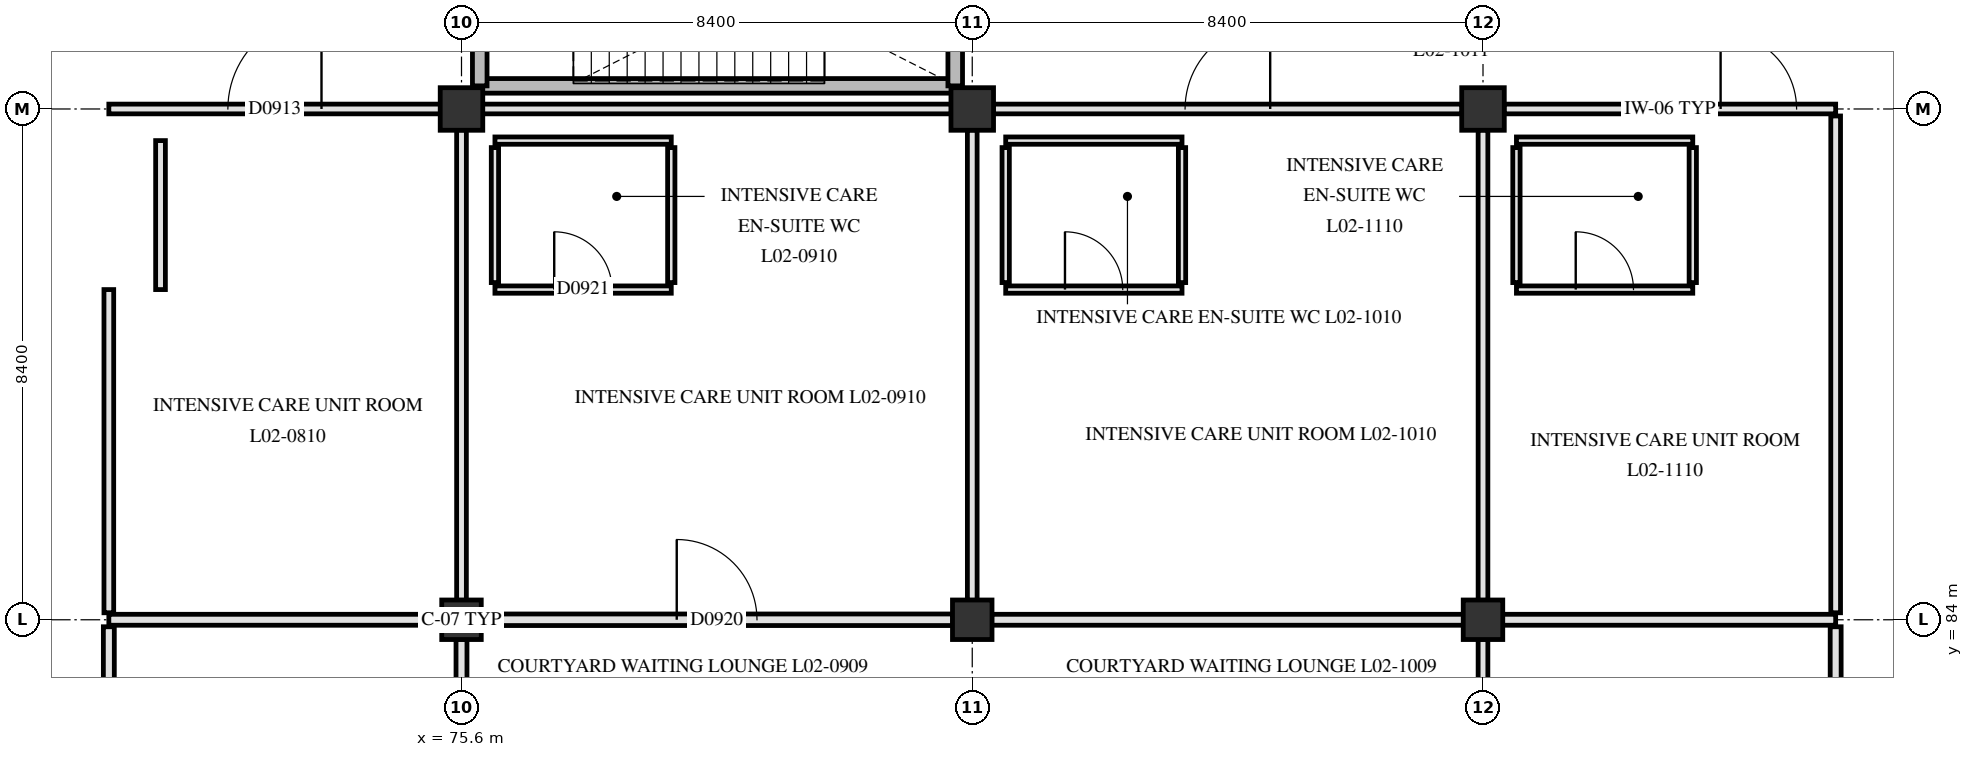
"""IFC4 building model, lengths in metres.
Left out: names, types, materials, properties, quantities, classifications, styles, units other than length and angle.
Written with IfcOpenShell. Run it as: python <this file> out.ifc"""

import sys

from ifc_helpers import new_model, si_unit, direction, frame, frame_2d, origin, origin_2d, place, context, subcontext, project, spatial, rectangle, circle, extrude, element, fill, save


model = new_model("IFC4")
c1 = context("Model", 3, precision=1e-05, world=origin(), true_north=direction((0.0, 1.0)))
c2 = subcontext(c1, "Body", "Model", "MODEL_VIEW")
j1 = project(units=[si_unit("LENGTHUNIT", "METRE"), si_unit("PLANEANGLEUNIT", "RADIAN")], contexts=[c1])
p1 = place(None, origin())
s1 = spatial("IfcSite", under=j1, at=p1, CompositionType="ELEMENT")
p2 = place(p1, origin())
s2 = spatial("IfcBuilding", under=s1, at=p2, CompositionType="ELEMENT")
p3 = place(p2, frame((0.0, 0.0, 9.3)))
s3 = spatial("IfcBuildingStorey", under=s2, at=p3, CompositionType="ELEMENT", Elevation=9.3)
p4 = place(p3, frame((75.6, 84.0, 0.0), z_axis=(0.0, 0.0, 1.0), x_axis=(1.0, 0.0, 0.0)))
e1 = element("IfcColumn", 1, at=p4, inside=s3, PredefinedType="COLUMN", context=c2, shape_type="SweptSolid", body=[
    extrude(circle(Radius=0.325, at=origin_2d()), origin(), (0.0, 0.0, 1.0), 5.1),
])
p5 = place(p3, frame((75.6, 92.4, 0.0), z_axis=(0.0, 0.0, 1.0), x_axis=(1.0, 0.0, 0.0)))
e2 = element("IfcColumn", 2, at=p5, inside=s3, PredefinedType="COLUMN", context=c2, shape_type="SweptSolid", body=[
    extrude(rectangle(XDim=0.7, YDim=0.7, at=origin_2d()), origin(), (0.0, 0.0, 1.0), 5.1),
])
p6 = place(p3, frame((84.0, 84.0, 0.0), z_axis=(0.0, 0.0, 1.0), x_axis=(1.0, 0.0, 0.0)))
e3 = element("IfcColumn", 3, at=p6, inside=s3, PredefinedType="COLUMN", context=c2, shape_type="SweptSolid", body=[
    extrude(circle(Radius=0.325, at=origin_2d()), origin(), (0.0, 0.0, 1.0), 5.1),
])
p7 = place(p3, frame((84.0, 92.4, 0.0), z_axis=(0.0, 0.0, 1.0), x_axis=(1.0, 0.0, 0.0)))
e4 = element("IfcColumn", 4, at=p7, inside=s3, PredefinedType="COLUMN", context=c2, shape_type="SweptSolid", body=[
    extrude(rectangle(XDim=0.7, YDim=0.7, at=origin_2d()), origin(), (0.0, 0.0, 1.0), 5.1),
])
p8 = place(p3, frame((92.4, 84.0, 0.0), z_axis=(0.0, 0.0, 1.0), x_axis=(1.0, 0.0, 0.0)))
e5 = element("IfcColumn", 5, at=p8, inside=s3, PredefinedType="COLUMN", context=c2, shape_type="SweptSolid", body=[
    extrude(circle(Radius=0.325, at=origin_2d()), origin(), (0.0, 0.0, 1.0), 5.1),
])
p9 = place(p3, frame((92.4, 92.4, 0.0), z_axis=(0.0, 0.0, 1.0), x_axis=(1.0, 0.0, 0.0)))
e6 = element("IfcColumn", 6, at=p9, inside=s3, PredefinedType="COLUMN", context=c2, shape_type="SweptSolid", body=[
    extrude(rectangle(XDim=0.7, YDim=0.7, at=origin_2d()), origin(), (0.0, 0.0, 1.0), 5.1),
])
p10 = place(p3, frame((75.9, 92.78, 0.0), z_axis=(0.0, 0.0, 1.0), x_axis=(1.0, 0.0, 0.0)))
e7 = element("IfcWall", 7, at=p10, inside=s3, PredefinedType="SHEAR", context=c2, shape_type="SweptSolid", body=[
    extrude(rectangle(XDim=7.82, YDim=0.24, at=frame_2d((3.91, 0.0))), origin(), (0.0, 0.0, 1.0), 4.78),
])
for number, where, z_axis, x_axis in (
    (8, (75.9, 92.78, 0.0), (0.0, 0.0, 1.0), (0.0, 1.0, 0.0)),
    (9, (83.72, 92.78, 0.0), (0.0, 0.0, 1.0), (0.0, 1.0, 0.0)),
):
    element("IfcWall", number, at=place(p3, frame(where, z_axis=z_axis, x_axis=x_axis)), inside=s3, PredefinedType="SHEAR", context=c2, shape_type="SweptSolid", body=[
        extrude(rectangle(XDim=3.32, YDim=0.24, at=frame_2d((1.66, 0.0))), origin(), (0.0, 0.0, 1.0), 4.78),
    ])
p11 = place(p3, frame((69.8, 84.0, 0.0), z_axis=(0.0, 0.0, 1.0), x_axis=(1.0, 0.0, 0.0)))
e10 = element("IfcWall", 10, at=p11, inside=s3, PredefinedType="PARTITIONING", context=c2, shape_type="SweptSolid", body=[
    extrude(rectangle(XDim=5.48, YDim=0.18, at=frame_2d((2.74, 0.0))), origin(), (0.0, 0.0, 1.0), 4.17),
])
p12 = place(p3, frame((75.92, 84.0, 0.0), z_axis=(0.0, 0.0, 1.0), x_axis=(1.0, 0.0, 0.0)))
e11 = element("IfcWall", 11, at=p12, inside=s3, PredefinedType="PARTITIONING", context=c2, shape_type="SweptSolid", body=[
    extrude(rectangle(XDim=7.76, YDim=0.19, at=frame_2d((3.88, 0.0))), origin(), (0.0, 0.0, 1.0), 4.17),
])
p13 = place(p12, frame((3.22, 0.0, 0.0)))
e12 = element("IfcOpeningElement", 12, at=p13, cuts=e11, PredefinedType="OPENING", context=c2, shape_type="SweptSolid", body=[
    extrude(rectangle(XDim=1.32, YDim=2.18, at=frame_2d((0.66, 1.09))), frame((0.0, 0.105, 0.0), z_axis=(0.0, -1.0, 0.0), x_axis=(1.0, 0.0, 0.0)), (0.0, 0.0, 1.0), 0.21),
])
p14 = place(p3, frame((84.32, 84.0, 0.0), z_axis=(0.0, 0.0, 1.0), x_axis=(1.0, 0.0, 0.0)))
e13 = element("IfcWall", 13, at=p14, inside=s3, PredefinedType="PARTITIONING", context=c2, shape_type="SweptSolid", body=[
    extrude(rectangle(XDim=7.76, YDim=0.18, at=frame_2d((3.88, 0.0))), origin(), (0.0, 0.0, 1.0), 4.17),
])
p15 = place(p3, frame((92.72, 84.0, 0.0), z_axis=(0.0, 0.0, 1.0), x_axis=(1.0, 0.0, 0.0)))
e14 = element("IfcWall", 14, at=p15, inside=s3, PredefinedType="PARTITIONING", context=c2, shape_type="SweptSolid", body=[
    extrude(rectangle(XDim=5.48, YDim=0.18, at=frame_2d((2.74, 0.0))), origin(), (0.0, 0.0, 1.0), 4.17),
])
p16 = place(p3, frame((76.15, 89.43, 0.0), z_axis=(0.0, 0.0, 1.0), x_axis=(1.0, 0.0, 0.0)))
e15 = element("IfcWall", 15, at=p16, inside=s3, PredefinedType="PARTITIONING", context=c2, shape_type="SweptSolid", body=[
    extrude(rectangle(XDim=2.9, YDim=0.12, at=frame_2d((1.45, 0.0))), origin(), (0.0, 0.0, 1.0), 4.77),
])
p17 = place(p16, frame((0.975, 0.0, 0.0)))
e16 = element("IfcOpeningElement", 16, at=p17, cuts=e15, PredefinedType="OPENING", context=c2, shape_type="SweptSolid", body=[
    extrude(rectangle(XDim=0.95, YDim=2.1, at=frame_2d((0.475, 1.05))), frame((0.0, 0.07, 0.0), z_axis=(0.0, -1.0, 0.0), x_axis=(1.0, 0.0, 0.0)), (0.0, 0.0, 1.0), 0.14),
])
p18 = place(p3, frame((84.55, 89.43, 0.0), z_axis=(0.0, 0.0, 1.0), x_axis=(1.0, 0.0, 0.0)))
e17 = element("IfcWall", 17, at=p18, inside=s3, PredefinedType="PARTITIONING", context=c2, shape_type="SweptSolid", body=[
    extrude(rectangle(XDim=2.9, YDim=0.12, at=frame_2d((1.45, 0.0))), origin(), (0.0, 0.0, 1.0), 4.77),
])
p19 = place(p18, frame((0.975, 0.0, 0.0)))
e18 = element("IfcOpeningElement", 18, at=p19, cuts=e17, PredefinedType="OPENING", context=c2, shape_type="SweptSolid", body=[
    extrude(rectangle(XDim=0.95, YDim=2.1, at=frame_2d((0.475, 1.05))), frame((0.0, 0.07, 0.0), z_axis=(0.0, -1.0, 0.0), x_axis=(1.0, 0.0, 0.0)), (0.0, 0.0, 1.0), 0.14),
])
p20 = place(p3, frame((92.95, 89.43, 0.0), z_axis=(0.0, 0.0, 1.0), x_axis=(1.0, 0.0, 0.0)))
e19 = element("IfcWall", 19, at=p20, inside=s3, PredefinedType="PARTITIONING", context=c2, shape_type="SweptSolid", body=[
    extrude(rectangle(XDim=2.9, YDim=0.12, at=frame_2d((1.45, 0.0))), origin(), (0.0, 0.0, 1.0), 4.77),
])
p21 = place(p20, frame((0.975, 0.0, 0.0)))
e20 = element("IfcOpeningElement", 20, at=p21, cuts=e19, PredefinedType="OPENING", context=c2, shape_type="SweptSolid", body=[
    extrude(rectangle(XDim=0.95, YDim=2.1, at=frame_2d((0.475, 1.05))), frame((0.0, 0.07, 0.0), z_axis=(0.0, -1.0, 0.0), x_axis=(1.0, 0.0, 0.0)), (0.0, 0.0, 1.0), 0.14),
])
p22 = place(p3, frame((76.15, 91.88, 0.0), z_axis=(0.0, 0.0, 1.0), x_axis=(1.0, 0.0, 0.0)))
e21 = element("IfcWall", 21, at=p22, inside=s3, PredefinedType="PARTITIONING", context=c2, shape_type="SweptSolid", body=[
    extrude(rectangle(XDim=2.9, YDim=0.12, at=frame_2d((1.45, 0.0))), origin(), (0.0, 0.0, 1.0), 4.77),
])
p23 = place(p3, frame((84.55, 91.88, 0.0), z_axis=(0.0, 0.0, 1.0), x_axis=(1.0, 0.0, 0.0)))
e22 = element("IfcWall", 22, at=p23, inside=s3, PredefinedType="PARTITIONING", context=c2, shape_type="SweptSolid", body=[
    extrude(rectangle(XDim=2.9, YDim=0.12, at=frame_2d((1.45, 0.0))), origin(), (0.0, 0.0, 1.0), 4.77),
])
p24 = place(p3, frame((92.95, 91.88, 0.0), z_axis=(0.0, 0.0, 1.0), x_axis=(1.0, 0.0, 0.0)))
e23 = element("IfcWall", 23, at=p24, inside=s3, PredefinedType="PARTITIONING", context=c2, shape_type="SweptSolid", body=[
    extrude(rectangle(XDim=2.9, YDim=0.12, at=frame_2d((1.45, 0.0))), origin(), (0.0, 0.0, 1.0), 4.77),
])
p25 = place(p3, frame((69.8, 92.4, 0.0), z_axis=(0.0, 0.0, 1.0), x_axis=(1.0, 0.0, 0.0)))
e24 = element("IfcWall", 24, at=p25, inside=s3, PredefinedType="PARTITIONING", context=c2, shape_type="SweptSolid", body=[
    extrude(rectangle(XDim=5.455, YDim=0.16, at=frame_2d((2.728, 0.0))), origin(), (0.0, 0.0, 1.0), 4.17),
])
p26 = place(p25, frame((1.958, 0.0, 0.0)))
e25 = element("IfcOpeningElement", 25, at=p26, cuts=e24, PredefinedType="OPENING", context=c2, shape_type="SweptSolid", body=[
    extrude(rectangle(XDim=1.54, YDim=2.24, at=frame_2d((0.77, 1.12))), frame((0.0, 0.09, 0.0), z_axis=(0.0, -1.0, 0.0), x_axis=(1.0, 0.0, 0.0)), (0.0, 0.0, 1.0), 0.18),
])
p27 = place(p3, frame((75.945, 92.4, 0.0), z_axis=(0.0, 0.0, 1.0), x_axis=(1.0, 0.0, 0.0)))
e26 = element("IfcWall", 26, at=p27, inside=s3, PredefinedType="PARTITIONING", context=c2, shape_type="SweptSolid", body=[
    extrude(rectangle(XDim=7.71, YDim=0.16, at=frame_2d((3.855, 0.0))), origin(), (0.0, 0.0, 1.0), 4.17),
])
p28 = place(p3, frame((84.345, 92.4, 0.0), z_axis=(0.0, 0.0, 1.0), x_axis=(1.0, 0.0, 0.0)))
e27 = element("IfcWall", 27, at=p28, inside=s3, PredefinedType="PARTITIONING", context=c2, shape_type="SweptSolid", body=[
    extrude(rectangle(XDim=7.71, YDim=0.16, at=frame_2d((3.855, 0.0))), origin(), (0.0, 0.0, 1.0), 4.17),
])
p29 = place(p28, frame((3.155, 0.0, 0.0)))
e28 = element("IfcOpeningElement", 28, at=p29, cuts=e27, PredefinedType="OPENING", context=c2, shape_type="SweptSolid", body=[
    extrude(rectangle(XDim=1.4, YDim=2.2, at=frame_2d((0.7, 1.1))), frame((0.0, 0.09, 0.0), z_axis=(0.0, -1.0, 0.0), x_axis=(1.0, 0.0, 0.0)), (0.0, 0.0, 1.0), 0.18),
])
p30 = place(p3, frame((92.745, 92.4, 0.0), z_axis=(0.0, 0.0, 1.0), x_axis=(1.0, 0.0, 0.0)))
e29 = element("IfcWall", 29, at=p30, inside=s3, PredefinedType="PARTITIONING", context=c2, shape_type="SweptSolid", body=[
    extrude(rectangle(XDim=5.455, YDim=0.16, at=frame_2d((2.728, 0.0))), origin(), (0.0, 0.0, 1.0), 4.17),
])
p31 = place(p30, frame((3.563, 0.0, 0.0)))
e30 = element("IfcOpeningElement", 30, at=p31, cuts=e29, PredefinedType="OPENING", context=c2, shape_type="SweptSolid", body=[
    extrude(rectangle(XDim=1.25, YDim=2.2, at=frame_2d((0.625, 1.1))), frame((0.0, 0.09, 0.0), z_axis=(0.0, -1.0, 0.0), x_axis=(1.0, 0.0, 0.0)), (0.0, 0.0, 1.0), 0.18),
])
p32 = place(p3, frame((69.8, 78.315, 0.0), z_axis=(0.0, 0.0, 1.0), x_axis=(0.0, 1.0, 0.0)))
e31 = element("IfcWall", 31, at=p32, inside=s3, PredefinedType="PARTITIONING", context=c2, shape_type="SweptSolid", body=[
    extrude(rectangle(XDim=5.57, YDim=0.18, at=frame_2d((2.785, 0.0))), origin(), (0.0, 0.0, 1.0), 4.17),
])
p33 = place(p3, frame((69.8, 84.115, 0.0), z_axis=(0.0, 0.0, 1.0), x_axis=(0.0, 1.0, 0.0)))
e32 = element("IfcWall", 32, at=p33, inside=s3, PredefinedType="PARTITIONING", context=c2, shape_type="SweptSolid", body=[
    extrude(rectangle(XDim=5.315, YDim=0.16, at=frame_2d((2.657, 0.0))), origin(), (0.0, 0.0, 1.0), 4.17),
])
p34 = place(p3, frame((70.65, 89.43, 0.0), z_axis=(0.0, 0.0, 1.0), x_axis=(0.0, 1.0, 0.0)))
e33 = element("IfcWall", 33, at=p34, inside=s3, PredefinedType="PARTITIONING", context=c2, shape_type="SweptSolid", body=[
    extrude(rectangle(XDim=2.45, YDim=0.16, at=frame_2d((1.225, 0.0))), origin(), (0.0, 0.0, 1.0), 4.77),
])
p35 = place(p3, frame((75.6, 78.315, 0.0), z_axis=(0.0, 0.0, 1.0), x_axis=(0.0, 1.0, 0.0)))
e34 = element("IfcWall", 34, at=p35, inside=s3, PredefinedType="PARTITIONING", context=c2, shape_type="SweptSolid", body=[
    extrude(rectangle(XDim=5.365, YDim=0.18, at=frame_2d((2.683, 0.0))), origin(), (0.0, 0.0, 1.0), 4.17),
])
p36 = place(p3, frame((75.6, 84.32, 0.0), z_axis=(0.0, 0.0, 1.0), x_axis=(0.0, 1.0, 0.0)))
e35 = element("IfcWall", 35, at=p36, inside=s3, PredefinedType="PARTITIONING", context=c2, shape_type="SweptSolid", body=[
    extrude(rectangle(XDim=7.735, YDim=0.16, at=frame_2d((3.867, 0.0))), origin(), (0.0, 0.0, 1.0), 4.17),
])
for number, where, z_axis, x_axis in (
    (36, (76.15, 89.545, 0.0), (0.0, 0.0, 1.0), (0.0, 1.0, 0.0)),
    (37, (79.05, 89.545, 0.0), (0.0, 0.0, 1.0), (0.0, 1.0, 0.0)),
):
    element("IfcWall", number, at=place(p3, frame(where, z_axis=z_axis, x_axis=x_axis)), inside=s3, PredefinedType="PARTITIONING", context=c2, shape_type="SweptSolid", body=[
        extrude(rectangle(XDim=2.22, YDim=0.12, at=frame_2d((1.11, 0.0))), origin(), (0.0, 0.0, 1.0), 4.77),
    ])
p37 = place(p3, frame((84.0, 84.32, 0.0), z_axis=(0.0, 0.0, 1.0), x_axis=(0.0, 1.0, 0.0)))
e38 = element("IfcWall", 38, at=p37, inside=s3, PredefinedType="PARTITIONING", context=c2, shape_type="SweptSolid", body=[
    extrude(rectangle(XDim=7.735, YDim=0.16, at=frame_2d((3.867, 0.0))), origin(), (0.0, 0.0, 1.0), 4.17),
])
for number, where, z_axis, x_axis in (
    (39, (84.55, 89.545, 0.0), (0.0, 0.0, 1.0), (0.0, 1.0, 0.0)),
    (40, (87.45, 89.545, 0.0), (0.0, 0.0, 1.0), (0.0, 1.0, 0.0)),
):
    element("IfcWall", number, at=place(p3, frame(where, z_axis=z_axis, x_axis=x_axis)), inside=s3, PredefinedType="PARTITIONING", context=c2, shape_type="SweptSolid", body=[
        extrude(rectangle(XDim=2.22, YDim=0.12, at=frame_2d((1.11, 0.0))), origin(), (0.0, 0.0, 1.0), 4.77),
    ])
p38 = place(p3, frame((92.4, 78.315, 0.0), z_axis=(0.0, 0.0, 1.0), x_axis=(0.0, 1.0, 0.0)))
e41 = element("IfcWall", 41, at=p38, inside=s3, PredefinedType="PARTITIONING", context=c2, shape_type="SweptSolid", body=[
    extrude(rectangle(XDim=5.365, YDim=0.16, at=frame_2d((2.683, 0.0))), origin(), (0.0, 0.0, 1.0), 4.17),
])
p39 = place(p3, frame((92.4, 84.32, 0.0), z_axis=(0.0, 0.0, 1.0), x_axis=(0.0, 1.0, 0.0)))
e42 = element("IfcWall", 42, at=p39, inside=s3, PredefinedType="PARTITIONING", context=c2, shape_type="SweptSolid", body=[
    extrude(rectangle(XDim=7.735, YDim=0.16, at=frame_2d((3.867, 0.0))), origin(), (0.0, 0.0, 1.0), 4.17),
])
for number, where, z_axis, x_axis in (
    (43, (92.95, 89.545, 0.0), (0.0, 0.0, 1.0), (0.0, 1.0, 0.0)),
    (44, (95.85, 89.545, 0.0), (0.0, 0.0, 1.0), (0.0, 1.0, 0.0)),
):
    element("IfcWall", number, at=place(p3, frame(where, z_axis=z_axis, x_axis=x_axis)), inside=s3, PredefinedType="PARTITIONING", context=c2, shape_type="SweptSolid", body=[
        extrude(rectangle(XDim=2.22, YDim=0.12, at=frame_2d((1.11, 0.0))), origin(), (0.0, 0.0, 1.0), 4.77),
    ])
p40 = place(p3, frame((98.2, 78.315, 0.0), z_axis=(0.0, 0.0, 1.0), x_axis=(0.0, 1.0, 0.0)))
e45 = element("IfcWall", 45, at=p40, inside=s3, PredefinedType="PARTITIONING", context=c2, shape_type="SweptSolid", body=[
    extrude(rectangle(XDim=5.57, YDim=0.18, at=frame_2d((2.785, 0.0))), origin(), (0.0, 0.0, 1.0), 4.17),
])
p41 = place(p3, frame((98.2, 84.115, 0.0), z_axis=(0.0, 0.0, 1.0), x_axis=(0.0, 1.0, 0.0)))
e46 = element("IfcWall", 46, at=p41, inside=s3, PredefinedType="PARTITIONING", context=c2, shape_type="SweptSolid", body=[
    extrude(rectangle(XDim=8.17, YDim=0.16, at=frame_2d((4.085, 0.0))), origin(), (0.0, 0.0, 1.0), 4.17),
])
p42 = place(p26, origin())
e47 = element("IfcDoor", 47, at=p42, inside=s3, OperationType="SINGLE_SWING_RIGHT", PredefinedType="DOOR", context=c2, shape_type="SweptSolid", body=[
    extrude(rectangle(XDim=1.54, YDim=2.24, at=frame_2d((0.77, 1.12))), frame((0.0, 0.025, 0.0), z_axis=(0.0, -1.0, 0.0), x_axis=(1.0, 0.0, 0.0)), (0.0, 0.0, 1.0), 0.05),
])
fill(e25, e47)
p43 = place(p13, origin())
e48 = element("IfcDoor", 48, at=p43, inside=s3, OperationType="SINGLE_SWING_LEFT", PredefinedType="DOOR", context=c2, shape_type="SweptSolid", body=[
    extrude(rectangle(XDim=1.32, YDim=2.18, at=frame_2d((0.66, 1.09))), frame((0.0, 0.025, 0.0), z_axis=(0.0, -1.0, 0.0), x_axis=(1.0, 0.0, 0.0)), (0.0, 0.0, 1.0), 0.05),
])
fill(e12, e48)
p44 = place(p17, origin())
e49 = element("IfcDoor", 49, at=p44, inside=s3, OperationType="SINGLE_SWING_LEFT", PredefinedType="DOOR", context=c2, shape_type="SweptSolid", body=[
    extrude(rectangle(XDim=0.95, YDim=2.1, at=frame_2d((0.475, 1.05))), frame((0.0, 0.025, 0.0), z_axis=(0.0, -1.0, 0.0), x_axis=(1.0, 0.0, 0.0)), (0.0, 0.0, 1.0), 0.05),
])
fill(e16, e49)
p45 = place(p29, origin())
e50 = element("IfcDoor", 50, at=p45, inside=s3, OperationType="SINGLE_SWING_RIGHT", PredefinedType="DOOR", context=c2, shape_type="SweptSolid", body=[
    extrude(rectangle(XDim=1.4, YDim=2.2, at=frame_2d((0.7, 1.1))), frame((0.0, 0.025, 0.0), z_axis=(0.0, -1.0, 0.0), x_axis=(1.0, 0.0, 0.0)), (0.0, 0.0, 1.0), 0.05),
])
fill(e28, e50)
p46 = place(p19, origin())
e51 = element("IfcDoor", 51, at=p46, inside=s3, OperationType="SINGLE_SWING_LEFT", PredefinedType="DOOR", context=c2, shape_type="SweptSolid", body=[
    extrude(rectangle(XDim=0.95, YDim=2.1, at=frame_2d((0.475, 1.05))), frame((0.0, 0.025, 0.0), z_axis=(0.0, -1.0, 0.0), x_axis=(1.0, 0.0, 0.0)), (0.0, 0.0, 1.0), 0.05),
])
fill(e18, e51)
p47 = place(p31, origin())
e52 = element("IfcDoor", 52, at=p47, inside=s3, OperationType="SINGLE_SWING_LEFT", PredefinedType="DOOR", context=c2, shape_type="SweptSolid", body=[
    extrude(rectangle(XDim=1.25, YDim=2.2, at=frame_2d((0.625, 1.1))), frame((0.0, 0.025, 0.0), z_axis=(0.0, -1.0, 0.0), x_axis=(1.0, 0.0, 0.0)), (0.0, 0.0, 1.0), 0.05),
])
fill(e30, e52)
p48 = place(p21, origin())
e53 = element("IfcDoor", 53, at=p48, inside=s3, OperationType="SINGLE_SWING_LEFT", PredefinedType="DOOR", context=c2, shape_type="SweptSolid", body=[
    extrude(rectangle(XDim=0.95, YDim=2.1, at=frame_2d((0.475, 1.05))), frame((0.0, 0.025, 0.0), z_axis=(0.0, -1.0, 0.0), x_axis=(1.0, 0.0, 0.0)), (0.0, 0.0, 1.0), 0.05),
])
fill(e20, e53)
save(model, sys.argv[1])
